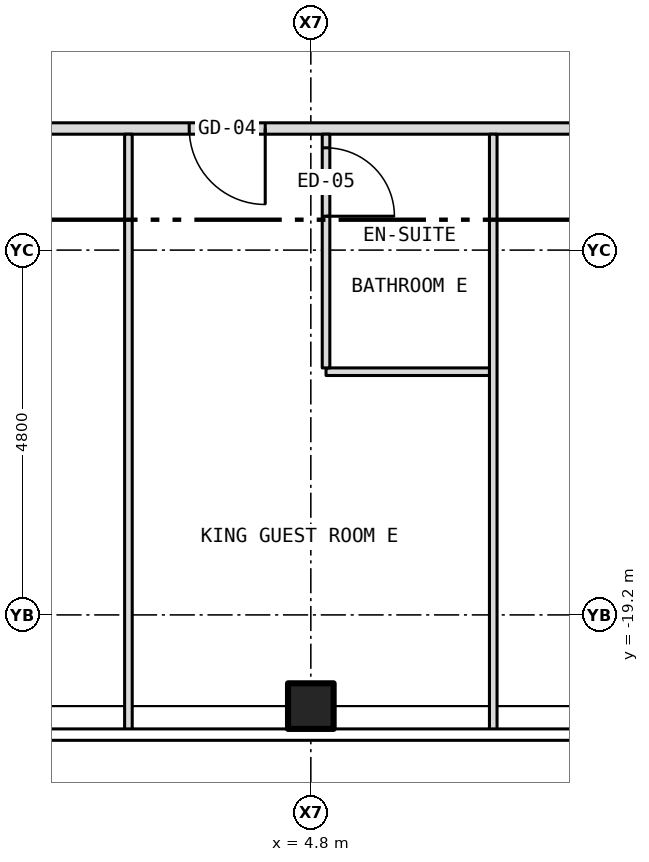
"""IFC4 building model, lengths in metres.
Left out: names, types, materials, properties, quantities, classifications, styles, units other than length and angle.
Written with IfcOpenShell. Run it as: python <this file> out.ifc"""

import sys

from ifc_helpers import new_model, si_unit, direction, frame, frame_2d, origin, origin_2d, place, context, subcontext, project, spatial, rectangle, hollow_rectangle, extrude, element, fill, save


model = new_model("IFC4")
c1 = context("Model", 3, precision=1e-05, world=origin(), true_north=direction((0.0, 1.0)))
c2 = subcontext(c1, "Body", "Model", "MODEL_VIEW")
j1 = project(units=[si_unit("LENGTHUNIT", "METRE"), si_unit("PLANEANGLEUNIT", "RADIAN")], contexts=[c1])
p1 = place(None, origin())
s1 = spatial("IfcSite", under=j1, at=p1, CompositionType="ELEMENT")
p2 = place(p1, origin())
s2 = spatial("IfcBuilding", under=s1, at=p2, CompositionType="ELEMENT")
p3 = place(p2, frame((0.0, 0.0, 255.0)))
s3 = spatial("IfcBuildingStorey", under=s2, at=p3, CompositionType="ELEMENT", Elevation=255.0)
p4 = place(p3, frame((4.8, -20.4, -0.15), z_axis=(0.0, 0.0, 1.0), x_axis=(1.0, 0.0, 0.0)))
e1 = element("IfcColumn", 1, at=p4, inside=s3, PredefinedType="COLUMN", context=c2, shape_type="SweptSolid", body=[
    extrude(hollow_rectangle(XDim=0.6, YDim=0.6, WallThickness=0.03, at=origin_2d()), origin(), (0.0, 0.0, 1.0), 3.5),
])
p5 = place(p3, frame((5.0, -16.0, 0.0), z_axis=(0.0, 0.0, 1.0), x_axis=(1.0, 0.0, 0.0)))
e2 = element("IfcWall", 2, at=p5, inside=s3, PredefinedType="PARTITIONING", context=c2, shape_type="SweptSolid", body=[
    extrude(rectangle(XDim=2.2, YDim=0.1, at=frame_2d((1.1, 0.0))), origin(), (0.0, 0.0, 1.0), 3.35),
])
p6 = place(p3, frame((-15.8, -12.8, 0.0), z_axis=(0.0, 0.0, 1.0), x_axis=(1.0, 0.0, 0.0)))
e3 = element("IfcWall", 3, at=p6, inside=s3, PredefinedType="PARTITIONING", context=c2, shape_type="SweptSolid", body=[
    extrude(rectangle(XDim=31.6, YDim=0.15, at=frame_2d((15.8, 0.0))), origin(), (0.0, 0.0, 1.0), 3.35),
])
p7 = place(p6, frame((10.55, 0.0, 0.0)))
e4 = element("IfcOpeningElement", 4, at=p7, cuts=e3, PredefinedType="OPENING", context=c2, shape_type="SweptSolid", body=[
    extrude(rectangle(XDim=0.9, YDim=2.1, at=frame_2d((0.45, 1.05))), frame((0.0, 0.087, 0.0), z_axis=(0.0, -1.0, 0.0), x_axis=(1.0, 0.0, 0.0)), (0.0, 0.0, 1.0), 0.174),
])
p8 = place(p6, frame((19.0, 0.0, 0.0)))
e5 = element("IfcOpeningElement", 5, at=p8, cuts=e3, PredefinedType="OPENING", context=c2, shape_type="SweptSolid", body=[
    extrude(rectangle(XDim=1.0, YDim=2.1, at=frame_2d((0.5, 1.05))), frame((0.0, 0.087, 0.0), z_axis=(0.0, -1.0, 0.0), x_axis=(1.0, 0.0, 0.0)), (0.0, 0.0, 1.0), 0.174),
])
p9 = place(p6, frame((24.95, 0.0, 0.0)))
e6 = element("IfcOpeningElement", 6, at=p9, cuts=e3, PredefinedType="OPENING", context=c2, shape_type="SweptSolid", body=[
    extrude(rectangle(XDim=0.9, YDim=2.1, at=frame_2d((0.45, 1.05))), frame((0.0, 0.087, 0.0), z_axis=(0.0, -1.0, 0.0), x_axis=(1.0, 0.0, 0.0)), (0.0, 0.0, 1.0), 0.174),
])
p10 = place(p6, frame((1.4, 0.0, 0.0)))
e7 = element("IfcOpeningElement", 7, at=p10, cuts=e3, PredefinedType="OPENING", context=c2, shape_type="SweptSolid", body=[
    extrude(rectangle(XDim=1.0, YDim=2.1, at=frame_2d((0.5, 1.05))), frame((0.0, 0.087, 0.0), z_axis=(0.0, -1.0, 0.0), x_axis=(1.0, 0.0, 0.0)), (0.0, 0.0, 1.0), 0.174),
])
p11 = place(p6, frame((29.2, 0.0, 0.0)))
e8 = element("IfcOpeningElement", 8, at=p11, cuts=e3, PredefinedType="OPENING", context=c2, shape_type="SweptSolid", body=[
    extrude(rectangle(XDim=1.0, YDim=2.1, at=frame_2d((0.5, 1.05))), frame((0.0, 0.087, 0.0), z_axis=(0.0, -1.0, 0.0), x_axis=(1.0, 0.0, 0.0)), (0.0, 0.0, 1.0), 0.174),
])
p12 = place(p3, frame((2.4, -20.73, 0.0), z_axis=(0.0, 0.0, 1.0), x_axis=(0.0, 1.0, 0.0)))
e9 = element("IfcWall", 9, at=p12, inside=s3, PredefinedType="PARTITIONING", context=c2, shape_type="SweptSolid", body=[
    extrude(rectangle(XDim=7.855, YDim=0.1, at=frame_2d((3.927, 0.0))), origin(), (0.0, 0.0, 1.0), 3.35),
])
p13 = place(p3, frame((5.0, -15.95, 0.0), z_axis=(0.0, 0.0, 1.0), x_axis=(0.0, 1.0, 0.0)))
e10 = element("IfcWall", 10, at=p13, inside=s3, PredefinedType="PARTITIONING", context=c2, shape_type="SweptSolid", body=[
    extrude(rectangle(XDim=3.075, YDim=0.1, at=frame_2d((1.538, 0.0))), origin(), (0.0, 0.0, 1.0), 3.35),
])
p14 = place(p13, frame((1.996, 0.0, 0.0)))
e11 = element("IfcOpeningElement", 11, at=p14, cuts=e10, PredefinedType="OPENING", context=c2, shape_type="SweptSolid", body=[
    extrude(rectangle(XDim=0.9, YDim=2.1, at=frame_2d((0.45, 1.05))), frame((0.0, 0.062, 0.0), z_axis=(0.0, -1.0, 0.0), x_axis=(1.0, 0.0, 0.0)), (0.0, 0.0, 1.0), 0.124),
])
p15 = place(p3, frame((7.2, -20.73, 0.0), z_axis=(0.0, 0.0, 1.0), x_axis=(0.0, 1.0, 0.0)))
e12 = element("IfcWall", 12, at=p15, inside=s3, PredefinedType="PARTITIONING", context=c2, shape_type="SweptSolid", body=[
    extrude(rectangle(XDim=7.855, YDim=0.1, at=frame_2d((3.927, 0.0))), origin(), (0.0, 0.0, 1.0), 3.35),
])
p16 = place(p8, origin())
e13 = element("IfcDoor", 13, at=p16, inside=s3, OperationType="SINGLE_SWING_RIGHT", PredefinedType="DOOR", context=c2, shape_type="SweptSolid", body=[
    extrude(rectangle(XDim=1.0, YDim=2.1, at=frame_2d((0.5, 1.05))), frame((0.0, 0.025, 0.0), z_axis=(0.0, -1.0, 0.0), x_axis=(1.0, 0.0, 0.0)), (0.0, 0.0, 1.0), 0.05),
])
fill(e5, e13)
p17 = place(p14, origin())
e14 = element("IfcDoor", 14, at=p17, inside=s3, OperationType="SINGLE_SWING_LEFT", PredefinedType="DOOR", context=c2, shape_type="SweptSolid", body=[
    extrude(rectangle(XDim=0.9, YDim=2.1, at=frame_2d((0.45, 1.05))), frame((0.0, 0.025, 0.0), z_axis=(0.0, -1.0, 0.0), x_axis=(1.0, 0.0, 0.0)), (0.0, 0.0, 1.0), 0.05),
])
fill(e11, e14)
save(model, sys.argv[1])
